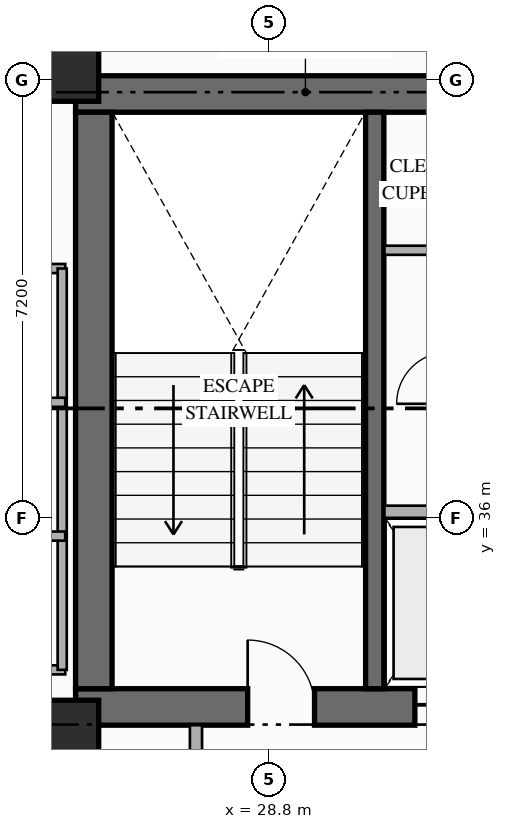
"""IFC4 building model, lengths in metres.
Left out: names, types, materials, properties, quantities, classifications, styles, units other than length and angle.
Written with IfcOpenShell. Run it as: python <this file> out.ifc"""

import sys

from ifc_helpers import new_model, si_unit, direction, frame, frame_2d, origin, origin_2d, place, context, subcontext, project, spatial, rectangle, extrude, element, fill, save


model = new_model("IFC4")
c1 = context("Model", 3, precision=1e-05, world=origin(), true_north=direction((0.0, 1.0)))
c2 = subcontext(c1, "Body", "Model", "MODEL_VIEW")
j1 = project(units=[si_unit("LENGTHUNIT", "METRE"), si_unit("PLANEANGLEUNIT", "RADIAN")], contexts=[c1])
p1 = place(None, origin())
s1 = spatial("IfcSite", under=j1, at=p1, CompositionType="ELEMENT")
p2 = place(p1, origin())
s2 = spatial("IfcBuilding", under=s1, at=p2, CompositionType="ELEMENT")
p3 = place(p2, frame((0.0, 0.0, 142.05)))
s3 = spatial("IfcBuildingStorey", under=s2, at=p3, CompositionType="ELEMENT", Elevation=142.05)
p4 = place(p3, frame((25.62, 32.89, 0.0), z_axis=(0.0, 0.0, 1.0), x_axis=(1.0, 0.0, 0.0)))
e1 = element("IfcWall", 1, at=p4, inside=s3, PredefinedType="SHEAR", context=c2, shape_type="SweptSolid", body=[
    extrude(rectangle(XDim=7.78, YDim=0.6, at=frame_2d((3.89, 0.0))), origin(), (0.0, 0.0, 1.0), 3.6),
])
p5 = place(p4, frame((2.83, 0.0, 0.0)))
e2 = element("IfcOpeningElement", 2, at=p5, cuts=e1, PredefinedType="OPENING", context=c2, shape_type="SweptSolid", body=[
    extrude(rectangle(XDim=1.1, YDim=2.2, at=frame_2d((0.55, 1.1))), frame((0.0, 0.31, 0.0), z_axis=(0.0, -1.0, 0.0), x_axis=(1.0, 0.0, 0.0)), (0.0, 0.0, 1.0), 0.62),
])
p6 = place(p4, frame((5.58, 0.0, 0.0)))
e3 = element("IfcOpeningElement", 3, at=p6, cuts=e1, PredefinedType="OPENING", context=c2, shape_type="SweptSolid", body=[
    extrude(rectangle(XDim=1.1, YDim=2.15, at=frame_2d((0.55, 1.075))), frame((0.0, 0.31, 0.0), z_axis=(0.0, -1.0, 0.0), x_axis=(1.0, 0.0, 0.0)), (0.0, 0.0, 1.0), 0.62),
])
p7 = place(p3, frame((25.62, 42.97, 0.0), z_axis=(0.0, 0.0, 1.0), x_axis=(1.0, 0.0, 0.0)))
e4 = element("IfcWall", 4, at=p7, inside=s3, PredefinedType="SHEAR", context=c2, shape_type="SweptSolid", body=[
    extrude(rectangle(XDim=7.78, YDim=0.6, at=frame_2d((3.89, 0.0))), origin(), (0.0, 0.0, 1.0), 3.6),
])
p8 = place(p3, frame((25.92, 33.19, 0.0), z_axis=(0.0, 0.0, 1.0), x_axis=(0.0, 1.0, 0.0)))
e5 = element("IfcWall", 5, at=p8, inside=s3, PredefinedType="SHEAR", context=c2, shape_type="SweptSolid", body=[
    extrude(rectangle(XDim=9.48, YDim=0.6, at=frame_2d((4.74, 0.0))), origin(), (0.0, 0.0, 1.0), 3.6),
])
p9 = place(p3, frame((30.54, 33.19, 0.0), z_axis=(0.0, 0.0, 1.0), x_axis=(0.0, 1.0, 0.0)))
e6 = element("IfcWall", 6, at=p9, inside=s3, PredefinedType="SHEAR", context=c2, shape_type="SweptSolid", body=[
    extrude(rectangle(XDim=9.48, YDim=0.3, at=frame_2d((4.74, 0.0))), origin(), (0.0, 0.0, 1.0), 3.6),
])
for number, where, z_axis, x_axis in (
    (7, (25.55, 32.55, 0.0), (0.0, 0.0, 1.0), (1.0, 0.0, 0.0)),
    (8, (25.55, 43.3, 0.0), (0.0, 0.0, 1.0), (1.0, 0.0, 0.0)),
):
    element("IfcColumn", number, at=place(p3, frame(where, z_axis=z_axis, x_axis=x_axis)), inside=s3, PredefinedType="COLUMN", context=c2, shape_type="SweptSolid", body=[
        extrude(rectangle(XDim=0.9, YDim=0.9, at=origin_2d()), origin(), (0.0, 0.0, 1.0), 3.6),
    ])
p10 = place(p3, frame((30.7, 36.1, 0.0), z_axis=(0.0, 0.0, 1.0), x_axis=(1.0, 0.0, 0.0)))
e9 = element("IfcWall", 9, at=p10, inside=s3, PredefinedType="STANDARD", context=c2, shape_type="SweptSolid", body=[
    extrude(rectangle(XDim=2.1, YDim=0.2, at=frame_2d((1.05, 0.0))), origin(), (0.0, 0.0, 1.0), 3.35),
])
p11 = place(p3, frame((30.7, 40.4, 0.0), z_axis=(0.0, 0.0, 1.0), x_axis=(1.0, 0.0, 0.0)))
e10 = element("IfcWall", 10, at=p11, inside=s3, PredefinedType="PARTITIONING", context=c2, shape_type="SweptSolid", body=[
    extrude(rectangle(XDim=2.1, YDim=0.15, at=frame_2d((1.05, 0.0))), origin(), (0.0, 0.0, 1.0), 3.35),
])
p12 = place(p3, frame((27.6, 29.2, 0.0), z_axis=(0.0, 0.0, 1.0), x_axis=(0.0, 1.0, 0.0)))
e11 = element("IfcWall", 11, at=p12, inside=s3, PredefinedType="STANDARD", context=c2, shape_type="SweptSolid", body=[
    extrude(rectangle(XDim=3.39, YDim=0.2, at=frame_2d((1.695, 0.0))), origin(), (0.0, 0.0, 1.0), 3.35),
])
for number, where, z_axis, x_axis in (
    (12, (22.15, 33.5, 0.0), (0.0, 0.0, 1.0), (1.0, 0.0, 0.0)),
    (13, (22.15, 40.1, 0.0), (0.0, 0.0, 1.0), (1.0, 0.0, 0.0)),
):
    element("IfcWall", number, at=place(p3, frame(where, z_axis=z_axis, x_axis=x_axis)), inside=s3, PredefinedType="PARTITIONING", context=c2, shape_type="SweptSolid", body=[
        extrude(rectangle(XDim=3.3, YDim=0.15, at=frame_2d((1.65, 0.0))), origin(), (0.0, 0.0, 1.0), 3.35),
    ])
p13 = place(p3, frame((25.4, 33.5, 0.0), z_axis=(0.0, 0.0, 1.0), x_axis=(0.0, 1.0, 0.0)))
e14 = element("IfcWall", 14, at=p13, inside=s3, PredefinedType="PARTITIONING", context=c2, shape_type="SweptSolid", body=[
    extrude(rectangle(XDim=6.6, YDim=0.15, at=frame_2d((3.3, 0.0))), origin(), (0.0, 0.0, 1.0), 3.35),
])
for number, where, z_axis, x_axis in (
    (15, (22.15, 35.7, 0.0), (0.0, 0.0, 1.0), (1.0, 0.0, 0.0)),
    (16, (22.15, 37.9, 0.0), (0.0, 0.0, 1.0), (1.0, 0.0, 0.0)),
):
    element("IfcWall", number, at=place(p3, frame(where, z_axis=z_axis, x_axis=x_axis)), inside=s3, PredefinedType="PARTITIONING", context=c2, shape_type="SweptSolid", body=[
        extrude(rectangle(XDim=3.3, YDim=0.15, at=frame_2d((1.65, 0.0))), origin(), (0.0, 0.0, 1.0), 3.35),
    ])
p14 = place(p5, origin())
e17 = element("IfcDoor", 17, at=p14, inside=s3, OperationType="SINGLE_SWING_LEFT", PredefinedType="DOOR", context=c2, shape_type="SweptSolid", body=[
    extrude(rectangle(XDim=1.1, YDim=2.2, at=frame_2d((0.55, 1.1))), frame((0.0, 0.025, 0.0), z_axis=(0.0, -1.0, 0.0), x_axis=(1.0, 0.0, 0.0)), (0.0, 0.0, 1.0), 0.05),
])
fill(e2, e17)
p15 = place(p6, origin())
e18 = element("IfcDoor", 18, at=p15, inside=s3, OperationType="SLIDING_TO_LEFT", PredefinedType="USERDEFINED", context=c2, shape_type="SweptSolid", body=[
    extrude(rectangle(XDim=1.1, YDim=2.15, at=frame_2d((0.55, 1.075))), frame((0.0, 0.025, 0.0), z_axis=(0.0, -1.0, 0.0), x_axis=(1.0, 0.0, 0.0)), (0.0, 0.0, 1.0), 0.05),
])
fill(e3, e18)
save(model, sys.argv[1])
